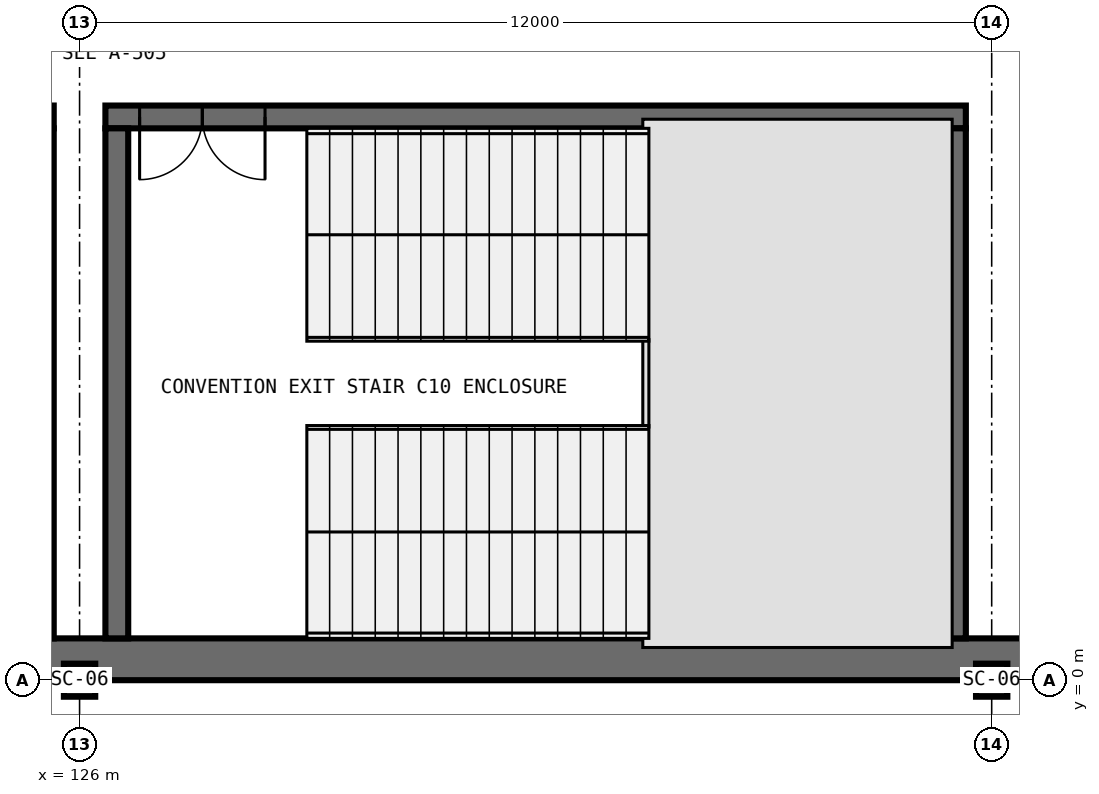
"""IFC4 building model, lengths in metres.
Left out: names, types, materials, properties, quantities, classifications, styles, units other than length and angle.
Written with IfcOpenShell. Run it as: python <this file> out.ifc"""

import sys

from ifc_helpers import new_model, si_unit, direction, frame, frame_2d, origin, origin_2d, place, context, subcontext, project, spatial, rectangle, i_section, extrude, element, fill, save


model = new_model("IFC4")
c1 = context("Model", 3, precision=1e-05, world=origin(), true_north=direction((0.0, 1.0)))
c2 = subcontext(c1, "Body", "Model", "MODEL_VIEW")
j1 = project(units=[si_unit("LENGTHUNIT", "METRE"), si_unit("PLANEANGLEUNIT", "RADIAN")], contexts=[c1])
p1 = place(None, origin())
s1 = spatial("IfcSite", under=j1, at=p1, CompositionType="ELEMENT")
p2 = place(p1, origin())
s2 = spatial("IfcBuilding", under=s1, at=p2, CompositionType="ELEMENT")
p3 = place(p2, frame((0.0, 0.0, -5.4)))
s3 = spatial("IfcBuildingStorey", under=s2, at=p3, CompositionType="ELEMENT", Elevation=-5.4)
for number, where, z_axis, x_axis in (
    (1, (126.0, 0.0, 0.0), (0.0, 0.0, 1.0), (1.0, 0.0, 0.0)),
    (2, (138.0, 0.0, 0.0), (0.0, 0.0, 1.0), (1.0, 0.0, 0.0)),
):
    element("IfcColumn", number, at=place(p3, frame(where, z_axis=z_axis, x_axis=x_axis)), inside=s3, PredefinedType="COLUMN", context=c2, shape_type="SweptSolid", body=[
        extrude(i_section(OverallWidth=0.412, OverallDepth=0.435, WebThickness=0.036, FlangeThickness=0.057, FilletRadius=0.031, at=origin_2d()), origin(), (0.0, 0.0, 1.0), 5.4),
    ])
p4 = place(p3, frame((0.0, 0.275, 0.0), z_axis=(0.0, 0.0, 1.0), x_axis=(1.0, 0.0, 0.0)))
e3 = element("IfcWall", 3, at=p4, inside=s3, PredefinedType="SOLIDWALL", context=c2, shape_type="SweptSolid", body=[
    extrude(rectangle(XDim=174.0, YDim=0.55, at=frame_2d((87.0, 0.0))), origin(), (0.0, 0.0, 1.0), 5.02),
])
p5 = place(p3, frame((125.66, 7.41, 0.0), z_axis=(0.0, 0.0, 1.0), x_axis=(-1.0, 0.0, 0.0)))
e4 = element("IfcWall", 4, at=p5, inside=s3, PredefinedType="SHEAR", context=c2, shape_type="SweptSolid", body=[
    extrude(rectangle(XDim=11.32, YDim=0.3, at=frame_2d((5.66, 0.0))), origin(), (0.0, 0.0, 1.0), 5.4),
])
p6 = place(p5, frame((9.22, 0.0, 0.0)))
e5 = element("IfcOpeningElement", 5, at=p6, cuts=e4, PredefinedType="OPENING", context=c2, shape_type="SweptSolid", body=[
    extrude(rectangle(XDim=1.65, YDim=2.25, at=frame_2d((0.825, 1.125))), frame((0.0, 0.165, 0.0), z_axis=(0.0, -1.0, 0.0), x_axis=(1.0, 0.0, 0.0)), (0.0, 0.0, 1.0), 0.33),
])
p7 = place(p3, frame((125.51, 0.55, 0.0), z_axis=(0.0, 0.0, 1.0), x_axis=(0.0, 1.0, 0.0)))
e6 = element("IfcWall", 6, at=p7, inside=s3, PredefinedType="SHEAR", context=c2, shape_type="SweptSolid", body=[
    extrude(rectangle(XDim=6.71, YDim=0.3, at=frame_2d((3.355, 0.0))), origin(), (0.0, 0.0, 1.0), 5.4),
])
p8 = place(p3, frame((137.66, 7.41, 0.0), z_axis=(0.0, 0.0, 1.0), x_axis=(-1.0, 0.0, 0.0)))
e7 = element("IfcWall", 7, at=p8, inside=s3, PredefinedType="SHEAR", context=c2, shape_type="SweptSolid", body=[
    extrude(rectangle(XDim=11.32, YDim=0.3, at=frame_2d((5.66, 0.0))), origin(), (0.0, 0.0, 1.0), 5.4),
])
p9 = place(p8, frame((9.22, 0.0, 0.0)))
e8 = element("IfcOpeningElement", 8, at=p9, cuts=e7, PredefinedType="OPENING", context=c2, shape_type="SweptSolid", body=[
    extrude(rectangle(XDim=1.65, YDim=2.25, at=frame_2d((0.825, 1.125))), frame((0.0, 0.165, 0.0), z_axis=(0.0, -1.0, 0.0), x_axis=(1.0, 0.0, 0.0)), (0.0, 0.0, 1.0), 0.33),
])
for number, where, z_axis, x_axis in (
    (9, (126.49, 7.26, 0.0), (0.0, 0.0, 1.0), (0.0, -1.0, 0.0)),
    (10, (137.51, 0.55, 0.0), (0.0, 0.0, 1.0), (0.0, 1.0, 0.0)),
):
    element("IfcWall", number, at=place(p3, frame(where, z_axis=z_axis, x_axis=x_axis)), inside=s3, PredefinedType="SHEAR", context=c2, shape_type="SweptSolid", body=[
        extrude(rectangle(XDim=6.71, YDim=0.3, at=frame_2d((3.355, 0.0))), origin(), (0.0, 0.0, 1.0), 5.4),
    ])
p10 = place(p9, origin())
e11 = element("IfcDoor", 11, at=p10, inside=s3, OperationType="DOUBLE_DOOR_SINGLE_SWING", PredefinedType="DOOR", context=c2, shape_type="SweptSolid", body=[
    extrude(rectangle(XDim=1.65, YDim=2.25, at=frame_2d((0.825, 1.125))), frame((0.0, 0.025, 0.0), z_axis=(0.0, -1.0, 0.0), x_axis=(1.0, 0.0, 0.0)), (0.0, 0.0, 1.0), 0.05),
])
fill(e8, e11)
save(model, sys.argv[1])
